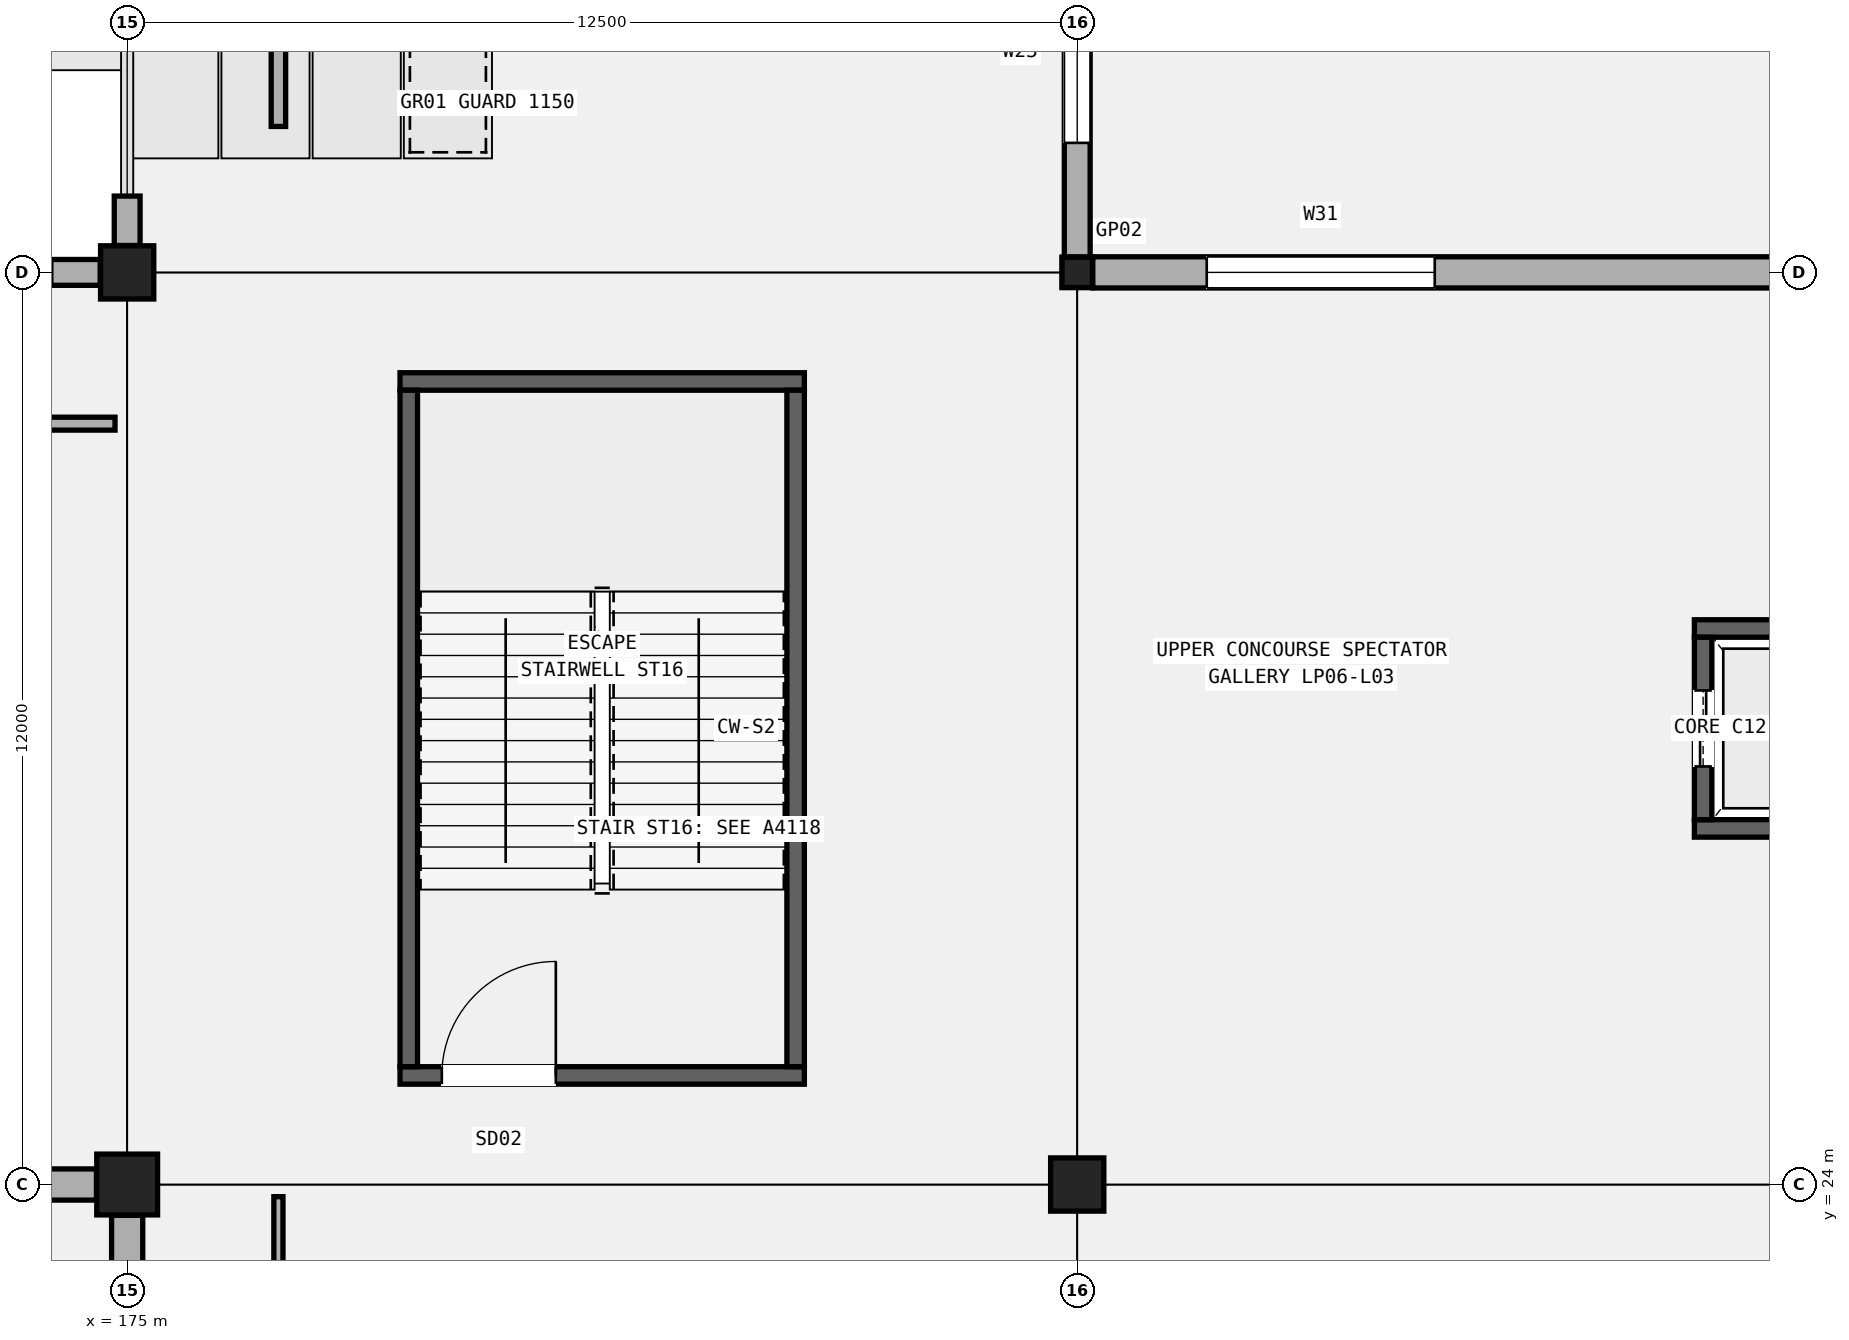
"""IFC4 building model, lengths in metres.
Left out: names, types, materials, properties, quantities, classifications, styles, units other than length and angle.
Written with IfcOpenShell. Run it as: python <this file> out.ifc"""

import sys

from ifc_helpers import new_model, si_unit, direction, frame, frame_2d, origin, origin_2d, place, context, subcontext, project, spatial, rectangle, hollow_rectangle, extrude, element, fill, save


model = new_model("IFC4")
c1 = context("Model", 3, precision=1e-05, world=origin(), true_north=direction((0.0, 1.0)))
c2 = subcontext(c1, "Body", "Model", "MODEL_VIEW")
j1 = project(units=[si_unit("LENGTHUNIT", "METRE"), si_unit("PLANEANGLEUNIT", "RADIAN")], contexts=[c1])
p1 = place(None, origin())
s1 = spatial("IfcSite", under=j1, at=p1, CompositionType="ELEMENT")
p2 = place(p1, origin())
s2 = spatial("IfcBuilding", under=s1, at=p2, CompositionType="ELEMENT")
p3 = place(p2, frame((0.0, 0.0, 15.3)))
s3 = spatial("IfcBuildingStorey", under=s2, at=p3, CompositionType="ELEMENT", Elevation=15.3)
p4 = place(p3, frame((175.0, 24.0, 0.0), z_axis=(0.0, 0.0, 1.0), x_axis=(1.0, 0.0, 0.0)))
e1 = element("IfcColumn", 1, at=p4, inside=s3, PredefinedType="COLUMN", context=c2, shape_type="SweptSolid", body=[
    extrude(rectangle(XDim=0.8, YDim=0.8, at=origin_2d()), origin(), (0.0, 0.0, 1.0), 5.1),
])
for number, where, z_axis, x_axis in (
    (2, (175.0, 36.0, 0.0), (0.0, 0.0, 1.0), (1.0, 0.0, 0.0)),
    (3, (187.5, 24.0, 0.0), (0.0, 0.0, 1.0), (1.0, 0.0, 0.0)),
):
    element("IfcColumn", number, at=place(p3, frame(where, z_axis=z_axis, x_axis=x_axis)), inside=s3, PredefinedType="COLUMN", context=c2, shape_type="SweptSolid", body=[
        extrude(rectangle(XDim=0.7, YDim=0.7, at=origin_2d()), origin(), (0.0, 0.0, 1.0), 5.1),
    ])
p5 = place(p3, frame((187.5, 36.0, 0.0), z_axis=(0.0, 0.0, 1.0), x_axis=(1.0, 0.0, 0.0)))
e4 = element("IfcColumn", 4, at=p5, inside=s3, PredefinedType="COLUMN", context=c2, shape_type="SweptSolid", body=[
    extrude(hollow_rectangle(XDim=0.4, YDim=0.4, WallThickness=0.016, InnerFilletRadius=0.016, OuterFilletRadius=0.032, at=origin_2d()), origin(), (0.0, 0.0, 1.0), 5.1),
])
p6 = place(p3, frame((162.679, 24.0, 0.0), z_axis=(0.0, 0.0, 1.0), x_axis=(1.0, 0.0, 0.0)))
e5 = element("IfcWall", 5, at=p6, inside=s3, PredefinedType="SOLIDWALL", context=c2, shape_type="SweptSolid", body=[
    extrude(rectangle(XDim=11.917, YDim=0.41, at=frame_2d((5.958, 0.0))), origin(), (0.0, 0.0, 1.0), 4.06),
])
p7 = place(p6, frame((1.5, 0.0, 0.95)))
e6 = element("IfcOpeningElement", 6, at=p7, cuts=e5, PredefinedType="OPENING", context=c2, shape_type="SweptSolid", body=[
    extrude(rectangle(XDim=2.1, YDim=2.25, at=frame_2d((1.05, 1.125))), frame((0.0, 0.215, 0.0), z_axis=(0.0, -1.0, 0.0), x_axis=(1.0, 0.0, 0.0)), (0.0, 0.0, 1.0), 0.43),
])
p8 = place(p3, frame((173.996, 36.0, 0.0), z_axis=(0.0, 0.0, 1.0), x_axis=(1.0, 0.0, 0.0)))
e7 = element("IfcWall", 7, at=p8, inside=s3, PredefinedType="SOLIDWALL", context=c2, shape_type="SweptSolid", body=[
    extrude(rectangle(XDim=0.65, YDim=0.34, at=frame_2d((0.325, 0.0))), origin(), (0.0, 0.0, 1.0), 4.16),
])
p9 = place(p3, frame((175.0, 12.179, 0.0), z_axis=(0.0, 0.0, 1.0), x_axis=(0.0, 1.0, 0.0)))
e8 = element("IfcWall", 8, at=p9, inside=s3, PredefinedType="SOLIDWALL", context=c2, shape_type="SweptSolid", body=[
    extrude(rectangle(XDim=11.417, YDim=0.41, at=frame_2d((5.708, 0.0))), origin(), (0.0, 0.0, 1.0), 4.06),
])
p10 = place(p9, frame((1.5, 0.0, 0.95)))
e9 = element("IfcOpeningElement", 9, at=p10, cuts=e8, PredefinedType="OPENING", context=c2, shape_type="SweptSolid", body=[
    extrude(rectangle(XDim=2.25, YDim=2.2, at=frame_2d((1.125, 1.1))), frame((0.0, 0.215, 0.0), z_axis=(0.0, -1.0, 0.0), x_axis=(1.0, 0.0, 0.0)), (0.0, 0.0, 1.0), 0.43),
])
p11 = place(p3, frame((175.0, 36.354, 0.0), z_axis=(0.0, 0.0, 1.0), x_axis=(0.0, 1.0, 0.0)))
e10 = element("IfcWall", 10, at=p11, inside=s3, PredefinedType="SOLIDWALL", context=c2, shape_type="SweptSolid", body=[
    extrude(rectangle(XDim=0.65, YDim=0.34, at=frame_2d((0.325, 0.0))), origin(), (0.0, 0.0, 1.0), 4.172),
])
p12 = place(p3, frame((187.5, 36.204, 0.0), z_axis=(0.0, 0.0, 1.0), x_axis=(0.0, 1.0, 0.0)))
e11 = element("IfcWall", 11, at=p12, inside=s3, PredefinedType="SOLIDWALL", context=c2, shape_type="SweptSolid", body=[
    extrude(rectangle(XDim=11.617, YDim=0.34, at=frame_2d((5.809, 0.0))), origin(), (0.0, 0.0, 1.0), 4.06),
])
p13 = place(p12, frame((1.5, 0.0, 0.95)))
e12 = element("IfcOpeningElement", 12, at=p13, cuts=e11, PredefinedType="OPENING", context=c2, shape_type="SweptSolid", body=[
    extrude(rectangle(XDim=2.4, YDim=1.65, at=frame_2d((1.2, 0.825))), frame((0.0, 0.18, 0.0), z_axis=(0.0, -1.0, 0.0), x_axis=(1.0, 0.0, 0.0)), (0.0, 0.0, 1.0), 0.36),
])
p14 = place(p3, frame((187.704, 36.0, 0.0), z_axis=(0.0, 0.0, 1.0), x_axis=(1.0, 0.0, 0.0)))
e13 = element("IfcWall", 13, at=p14, inside=s3, PredefinedType="SOLIDWALL", context=c2, shape_type="SweptSolid", body=[
    extrude(rectangle(XDim=12.117, YDim=0.41, at=frame_2d((6.059, 0.0))), origin(), (0.0, 0.0, 1.0), 4.06),
])
p15 = place(p14, frame((1.5, 0.0, 0.95)))
e14 = element("IfcOpeningElement", 14, at=p15, cuts=e13, PredefinedType="OPENING", context=c2, shape_type="SweptSolid", body=[
    extrude(rectangle(XDim=3.0, YDim=2.15, at=frame_2d((1.5, 1.075))), frame((0.0, 0.215, 0.0), z_axis=(0.0, -1.0, 0.0), x_axis=(1.0, 0.0, 0.0)), (0.0, 0.0, 1.0), 0.43),
])
p16 = place(p3, frame((178.59, 25.435, 0.0), z_axis=(0.0, 0.0, 1.0), x_axis=(1.0, 0.0, 0.0)))
e15 = element("IfcWall", 15, at=p16, inside=s3, PredefinedType="SHEAR", context=c2, shape_type="SweptSolid", body=[
    extrude(rectangle(XDim=5.32, YDim=0.23, at=frame_2d((2.66, 0.0))), origin(), (0.0, 0.0, 1.0), 4.86),
])
p17 = place(p16, frame((0.55, 0.0, 0.0)))
e16 = element("IfcOpeningElement", 16, at=p17, cuts=e15, PredefinedType="OPENING", context=c2, shape_type="SweptSolid", body=[
    extrude(rectangle(XDim=1.5, YDim=2.2, at=frame_2d((0.75, 1.1))), frame((0.0, 0.125, 0.0), z_axis=(0.0, -1.0, 0.0), x_axis=(1.0, 0.0, 0.0)), (0.0, 0.0, 1.0), 0.25),
])
p18 = place(p3, frame((178.59, 34.565, 0.0), z_axis=(0.0, 0.0, 1.0), x_axis=(1.0, 0.0, 0.0)))
e17 = element("IfcWall", 17, at=p18, inside=s3, PredefinedType="SHEAR", context=c2, shape_type="SweptSolid", body=[
    extrude(rectangle(XDim=5.32, YDim=0.23, at=frame_2d((2.66, 0.0))), origin(), (0.0, 0.0, 1.0), 4.86),
])
for number, where, z_axis, x_axis in (
    (18, (178.705, 25.55, 0.0), (0.0, 0.0, 1.0), (0.0, 1.0, 0.0)),
    (19, (183.795, 25.55, 0.0), (0.0, 0.0, 1.0), (0.0, 1.0, 0.0)),
):
    element("IfcWall", number, at=place(p3, frame(where, z_axis=z_axis, x_axis=x_axis)), inside=s3, PredefinedType="SHEAR", context=c2, shape_type="SweptSolid", body=[
        extrude(rectangle(XDim=8.9, YDim=0.23, at=frame_2d((4.45, 0.0))), origin(), (0.0, 0.0, 1.0), 4.86),
    ])
for number, where, z_axis, x_axis in (
    (20, (195.62, 28.685, 0.0), (0.0, 0.0, 1.0), (1.0, 0.0, 0.0)),
    (21, (195.62, 31.315, 0.0), (0.0, 0.0, 1.0), (1.0, 0.0, 0.0)),
):
    element("IfcWall", number, at=place(p3, frame(where, z_axis=z_axis, x_axis=x_axis)), inside=s3, PredefinedType="SHEAR", context=c2, shape_type="SweptSolid", body=[
        extrude(rectangle(XDim=2.36, YDim=0.23, at=frame_2d((1.18, 0.0))), origin(), (0.0, 0.0, 1.0), 4.86),
    ])
p19 = place(p3, frame((195.735, 28.8, 0.0), z_axis=(0.0, 0.0, 1.0), x_axis=(0.0, 1.0, 0.0)))
e22 = element("IfcWall", 22, at=p19, inside=s3, PredefinedType="SHEAR", context=c2, shape_type="SweptSolid", body=[
    extrude(rectangle(XDim=2.4, YDim=0.23, at=frame_2d((1.2, 0.0))), origin(), (0.0, 0.0, 1.0), 4.86),
])
p20 = place(p19, frame((0.7, 0.0, 0.0)))
e23 = element("IfcOpeningElement", 23, at=p20, cuts=e22, PredefinedType="OPENING", context=c2, shape_type="SweptSolid", body=[
    extrude(rectangle(XDim=1.0, YDim=2.15, at=frame_2d((0.5, 1.075))), frame((0.0, 0.125, 0.0), z_axis=(0.0, -1.0, 0.0), x_axis=(1.0, 0.0, 0.0)), (0.0, 0.0, 1.0), 0.25),
])
p21 = place(p3, frame((162.66, 34.01, 0.0), z_axis=(0.0, 0.0, 1.0), x_axis=(1.0, 0.0, 0.0)))
e24 = element("IfcWall", 24, at=p21, inside=s3, PredefinedType="PARTITIONING", context=c2, shape_type="SweptSolid", body=[
    extrude(rectangle(XDim=12.18, YDim=0.17, at=frame_2d((6.09, 0.0))), origin(), (0.0, 0.0, 1.0), 2.77),
])
p22 = place(p21, frame((6.97, 0.0, 0.0), z_axis=(0.0, 0.0, 1.0), x_axis=(-1.0, 0.0, 0.0)))
e25 = element("IfcOpeningElement", 25, at=p22, cuts=e24, PredefinedType="OPENING", context=c2, shape_type="SweptSolid", body=[
    extrude(rectangle(XDim=1.76, YDim=2.3, at=frame_2d((0.88, 1.15))), frame((0.0, 0.095, 0.0), z_axis=(0.0, -1.0, 0.0), x_axis=(1.0, 0.0, 0.0)), (0.0, 0.0, 1.0), 0.19),
])
p23 = place(p3, frame((176.99, 12.024, 0.0), z_axis=(0.0, 0.0, 1.0), x_axis=(0.0, 1.0, 0.0)))
e26 = element("IfcWall", 26, at=p23, inside=s3, PredefinedType="PARTITIONING", context=c2, shape_type="SweptSolid", body=[
    extrude(rectangle(XDim=11.816, YDim=0.12, at=frame_2d((5.908, 0.0))), origin(), (0.0, 0.0, 1.0), 2.77),
])
p24 = place(p23, frame((3.487, 0.0, 0.0), z_axis=(0.0, 0.0, 1.0), x_axis=(-1.0, 0.0, 0.0)))
e27 = element("IfcOpeningElement", 27, at=p24, cuts=e26, PredefinedType="OPENING", context=c2, shape_type="SweptSolid", body=[
    extrude(rectangle(XDim=1.0, YDim=2.14, at=frame_2d((0.5, 1.07))), frame((0.0, 0.07, 0.0), z_axis=(0.0, -1.0, 0.0), x_axis=(1.0, 0.0, 0.0)), (0.0, 0.0, 1.0), 0.14),
])
p25 = place(p23, frame((9.422, 0.0, 0.0), z_axis=(0.0, 0.0, 1.0), x_axis=(-1.0, 0.0, 0.0)))
e28 = element("IfcOpeningElement", 28, at=p25, cuts=e26, PredefinedType="OPENING", context=c2, shape_type="SweptSolid", body=[
    extrude(rectangle(XDim=1.03, YDim=2.12, at=frame_2d((0.515, 1.06))), frame((0.0, 0.07, 0.0), z_axis=(0.0, -1.0, 0.0), x_axis=(1.0, 0.0, 0.0)), (0.0, 0.0, 1.0), 0.14),
])
p26 = place(p3, frame((176.99, 37.92, 0.0), z_axis=(0.0, 0.0, 1.0), x_axis=(0.0, 1.0, 0.0)))
e29 = element("IfcWall", 29, at=p26, inside=s3, PredefinedType="PARTITIONING", context=c2, shape_type="SweptSolid", body=[
    extrude(rectangle(XDim=9.92, YDim=0.19, at=frame_2d((4.96, 0.0))), origin(), (0.0, 0.0, 1.0), 2.77),
])
p27 = place(p26, frame((5.49, 0.0, 0.0), z_axis=(0.0, 0.0, 1.0), x_axis=(-1.0, 0.0, 0.0)))
e30 = element("IfcOpeningElement", 30, at=p27, cuts=e29, PredefinedType="OPENING", context=c2, shape_type="SweptSolid", body=[
    extrude(rectangle(XDim=1.06, YDim=2.15, at=frame_2d((0.53, 1.075))), frame((0.0, 0.105, 0.0), z_axis=(0.0, -1.0, 0.0), x_axis=(1.0, 0.0, 0.0)), (0.0, 0.0, 1.0), 0.21),
])
p28 = place(p13, origin())
e31 = element("IfcWindow", 31, at=p28, inside=s3, PartitioningType="SINGLE_PANEL", PredefinedType="WINDOW", context=c2, shape_type="SweptSolid", body=[
    extrude(rectangle(XDim=2.4, YDim=1.65, at=frame_2d((1.2, 0.825))), frame((0.0, 0.03, 0.0), z_axis=(0.0, -1.0, 0.0), x_axis=(1.0, 0.0, 0.0)), (0.0, 0.0, 1.0), 0.06),
])
fill(e12, e31)
p29 = place(p15, origin())
e32 = element("IfcWindow", 32, at=p29, inside=s3, PartitioningType="SINGLE_PANEL", PredefinedType="WINDOW", context=c2, shape_type="SweptSolid", body=[
    extrude(rectangle(XDim=3.0, YDim=2.15, at=frame_2d((1.5, 1.075))), frame((0.0, 0.03, 0.0), z_axis=(0.0, -1.0, 0.0), x_axis=(1.0, 0.0, 0.0)), (0.0, 0.0, 1.0), 0.06),
])
fill(e14, e32)
p30 = place(p17, origin())
e33 = element("IfcDoor", 33, at=p30, inside=s3, OperationType="SINGLE_SWING_RIGHT", PredefinedType="DOOR", context=c2, shape_type="SweptSolid", body=[
    extrude(rectangle(XDim=1.5, YDim=2.2, at=frame_2d((0.75, 1.1))), frame((0.0, 0.025, 0.0), z_axis=(0.0, -1.0, 0.0), x_axis=(1.0, 0.0, 0.0)), (0.0, 0.0, 1.0), 0.05),
])
fill(e16, e33)
p31 = place(p20, origin())
e34 = element("IfcDoor", 34, at=p31, inside=s3, OperationType="DOUBLE_DOOR_SLIDING", PredefinedType="DOOR", context=c2, shape_type="SweptSolid", body=[
    extrude(rectangle(XDim=1.0, YDim=2.15, at=frame_2d((0.5, 1.075))), frame((0.0, 0.025, 0.0), z_axis=(0.0, -1.0, 0.0), x_axis=(1.0, 0.0, 0.0)), (0.0, 0.0, 1.0), 0.05),
])
fill(e23, e34)
save(model, sys.argv[1])
